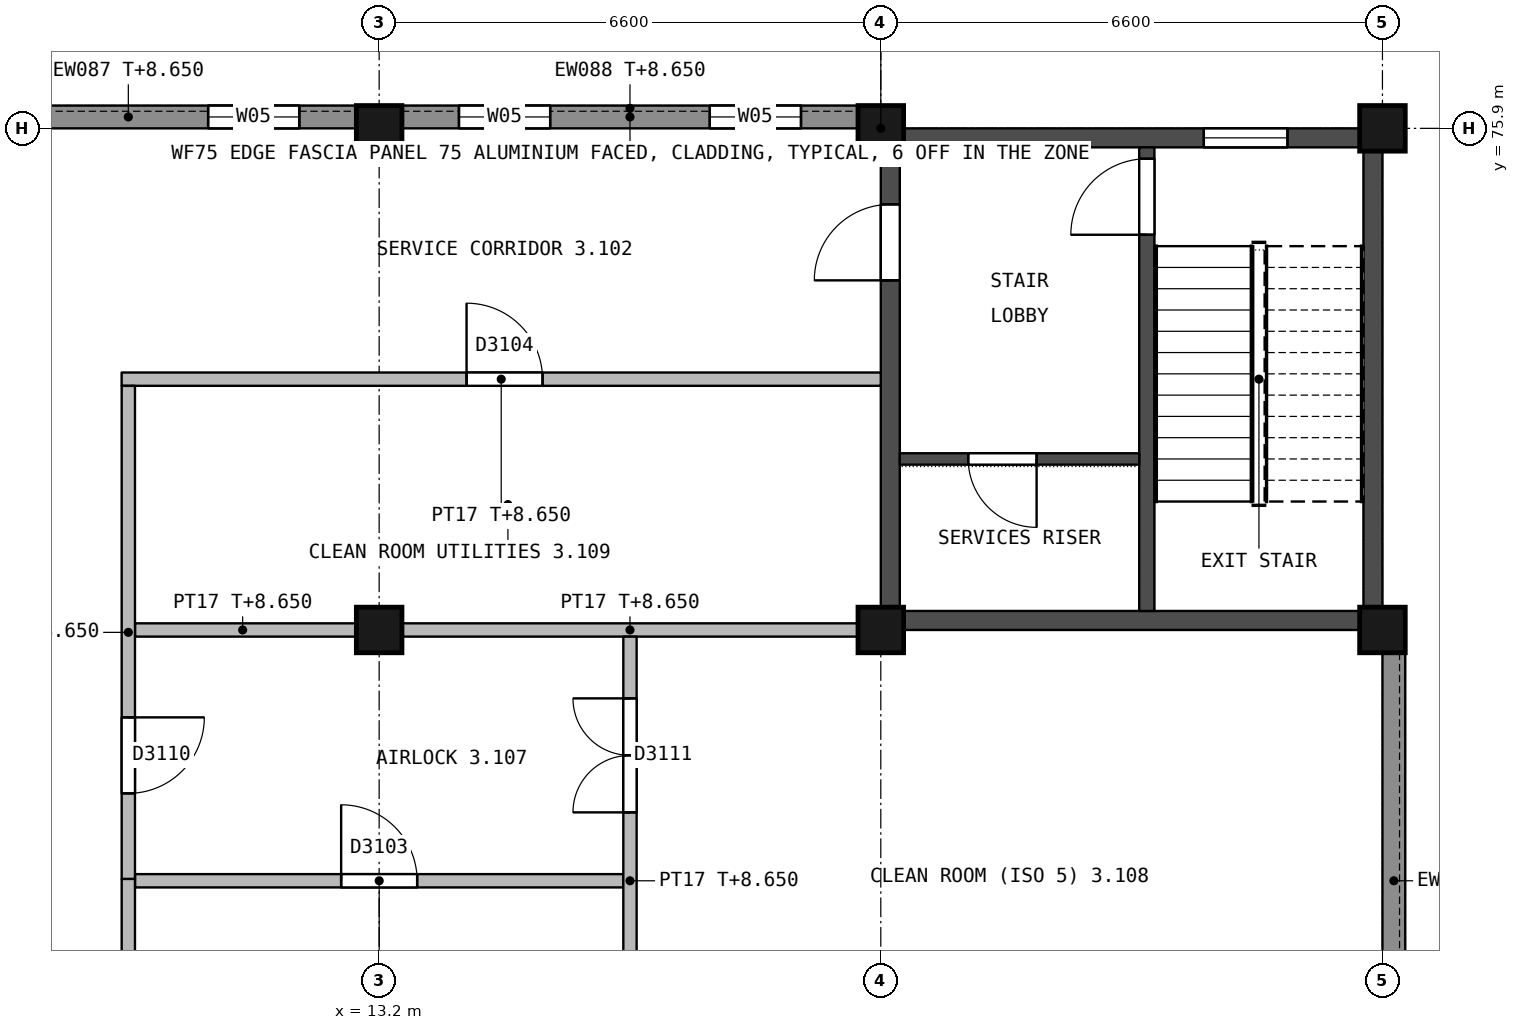
"""IFC4 building model, lengths in metres.
Left out: names, types, materials, properties, quantities, classifications, styles, units other than length and angle.
Written with IfcOpenShell. Run it as: python <this file> out.ifc"""

import sys

from ifc_helpers import new_model, si_unit, direction, frame, frame_2d, origin, origin_2d, place, context, subcontext, project, spatial, rectangle, extrude, element, fill, save


model = new_model("IFC4")
c1 = context("Model", 3, precision=1e-05, world=origin(), true_north=direction((0.0, 1.0)))
c2 = subcontext(c1, "Body", "Model", "MODEL_VIEW")
j1 = project(units=[si_unit("LENGTHUNIT", "METRE"), si_unit("PLANEANGLEUNIT", "RADIAN")], contexts=[c1])
p1 = place(None, origin())
s1 = spatial("IfcSite", under=j1, at=p1, CompositionType="ELEMENT")
p2 = place(p1, origin())
s2 = spatial("IfcBuilding", under=s1, at=p2, CompositionType="ELEMENT")
p3 = place(p2, frame((0.0, 0.0, 5.4)))
s3 = spatial("IfcBuildingStorey", under=s2, at=p3, CompositionType="ELEMENT", Elevation=5.4)
for number, where, z_axis, x_axis in (
    (1, (13.2, 69.3, 0.0), (0.0, 0.0, 1.0), (1.0, 0.0, 0.0)),
    (2, (13.2, 75.9, 0.0), (0.0, 0.0, 1.0), (1.0, 0.0, 0.0)),
    (3, (19.8, 69.3, 0.0), (0.0, 0.0, 1.0), (1.0, 0.0, 0.0)),
    (4, (19.8, 75.9, 0.0), (0.0, 0.0, 1.0), (1.0, 0.0, 0.0)),
    (5, (26.4, 69.3, 0.0), (0.0, 0.0, 1.0), (1.0, 0.0, 0.0)),
    (6, (26.4, 75.9, 0.0), (0.0, 0.0, 1.0), (1.0, 0.0, 0.0)),
):
    element("IfcColumn", number, at=place(p3, frame(where, z_axis=z_axis, x_axis=x_axis)), inside=s3, PredefinedType="COLUMN", context=c2, shape_type="SweptSolid", body=[
        extrude(rectangle(XDim=0.6, YDim=0.6, at=origin_2d()), origin(), (0.0, 0.0, 1.0), 4.5),
    ])
p4 = place(p3, frame((19.925, 75.9, 0.0), z_axis=(0.0, 0.0, 1.0), x_axis=(0.0, -1.0, 0.0)))
e7 = element("IfcWall", 7, at=p4, inside=s3, PredefinedType="SHEAR", context=c2, shape_type="SweptSolid", body=[
    extrude(rectangle(XDim=6.6, YDim=0.25, at=frame_2d((3.3, 0.0))), origin(), (0.0, 0.0, 1.0), 4.15),
])
p5 = place(p4, frame((1.0, 0.0, 0.0)))
e8 = element("IfcOpeningElement", 8, at=p5, cuts=e7, PredefinedType="OPENING", context=c2, shape_type="SweptSolid", body=[
    extrude(rectangle(XDim=1.0, YDim=2.1, at=frame_2d((0.5, 1.05))), frame((0.0, 0.135, 0.0), z_axis=(0.0, -1.0, 0.0), x_axis=(1.0, 0.0, 0.0)), (0.0, 0.0, 1.0), 0.27),
])
p6 = place(p3, frame((26.275, 75.9, 0.0), z_axis=(0.0, 0.0, 1.0), x_axis=(0.0, -1.0, 0.0)))
e9 = element("IfcWall", 9, at=p6, inside=s3, PredefinedType="SHEAR", context=c2, shape_type="SweptSolid", body=[
    extrude(rectangle(XDim=6.6, YDim=0.25, at=frame_2d((3.3, 0.0))), origin(), (0.0, 0.0, 1.0), 4.15),
])
p7 = place(p3, frame((20.05, 75.775, 0.0), z_axis=(0.0, 0.0, 1.0), x_axis=(1.0, 0.0, 0.0)))
e10 = element("IfcWall", 10, at=p7, inside=s3, PredefinedType="SHEAR", context=c2, shape_type="SweptSolid", body=[
    extrude(rectangle(XDim=6.1, YDim=0.25, at=frame_2d((3.05, 0.0))), origin(), (0.0, 0.0, 1.0), 4.15),
])
p8 = place(p7, frame((4.0, 0.0, 0.7)))
e11 = element("IfcOpeningElement", 11, at=p8, cuts=e10, PredefinedType="OPENING", context=c2, shape_type="SweptSolid", body=[
    extrude(rectangle(XDim=1.1, YDim=1.5, at=frame_2d((0.55, 0.75))), frame((0.0, 0.135, 0.0), z_axis=(0.0, -1.0, 0.0), x_axis=(1.0, 0.0, 0.0)), (0.0, 0.0, 1.0), 0.27),
])
p9 = place(p3, frame((20.05, 69.425, 0.0), z_axis=(0.0, 0.0, 1.0), x_axis=(1.0, 0.0, 0.0)))
e12 = element("IfcWall", 12, at=p9, inside=s3, PredefinedType="SHEAR", context=c2, shape_type="SweptSolid", body=[
    extrude(rectangle(XDim=6.1, YDim=0.25, at=frame_2d((3.05, 0.0))), origin(), (0.0, 0.0, 1.0), 4.15),
])
p10 = place(p3, frame((23.3, 75.65, 0.0), z_axis=(0.0, 0.0, 1.0), x_axis=(0.0, -1.0, 0.0)))
e13 = element("IfcWall", 13, at=p10, inside=s3, PredefinedType="SHEAR", context=c2, shape_type="SweptSolid", body=[
    extrude(rectangle(XDim=6.1, YDim=0.2, at=frame_2d((3.05, 0.0))), origin(), (0.0, 0.0, 1.0), 4.15),
])
p11 = place(p10, frame((0.15, 0.0, 0.0)))
e14 = element("IfcOpeningElement", 14, at=p11, cuts=e13, PredefinedType="OPENING", context=c2, shape_type="SweptSolid", body=[
    extrude(rectangle(XDim=1.0, YDim=2.1, at=frame_2d((0.5, 1.05))), frame((0.0, 0.11, 0.0), z_axis=(0.0, -1.0, 0.0), x_axis=(1.0, 0.0, 0.0)), (0.0, 0.0, 1.0), 0.22),
])
p12 = place(p3, frame((20.05, 71.55, 0.0), z_axis=(0.0, 0.0, 1.0), x_axis=(1.0, 0.0, 0.0)))
e15 = element("IfcWall", 15, at=p12, inside=s3, PredefinedType="SHEAR", context=c2, shape_type="SweptSolid", body=[
    extrude(rectangle(XDim=3.15, YDim=0.15, at=frame_2d((1.575, 0.0))), origin(), (0.0, 0.0, 1.0), 4.15),
])
p13 = place(p12, frame((0.9, 0.0, 0.0)))
e16 = element("IfcOpeningElement", 16, at=p13, cuts=e15, PredefinedType="OPENING", context=c2, shape_type="SweptSolid", body=[
    extrude(rectangle(XDim=0.9, YDim=2.1, at=frame_2d((0.45, 1.05))), frame((0.0, 0.085, 0.0), z_axis=(0.0, -1.0, 0.0), x_axis=(1.0, 0.0, 0.0)), (0.0, 0.0, 1.0), 0.17),
])
p14 = place(p3, frame((26.55, 69.0, 0.0), z_axis=(0.0, 0.0, 1.0), x_axis=(0.0, -1.0, 0.0)))
e17 = element("IfcWall", 17, at=p14, inside=s3, PredefinedType="STANDARD", context=c2, shape_type="SweptSolid", body=[
    extrude(rectangle(XDim=6.0, YDim=0.3, at=frame_2d((3.0, 0.0))), origin(), (0.0, 0.0, 1.0), 3.25),
])
p15 = place(p3, frame((6.9, 76.05, 0.0), z_axis=(0.0, 0.0, 1.0), x_axis=(1.0, 0.0, 0.0)))
e18 = element("IfcWall", 18, at=p15, inside=s3, PredefinedType="STANDARD", context=c2, shape_type="SweptSolid", body=[
    extrude(rectangle(XDim=6.0, YDim=0.3, at=frame_2d((3.0, 0.0))), origin(), (0.0, 0.0, 1.0), 3.25),
])
p16 = place(p15, frame((0.75, 0.0, 1.1)))
e19 = element("IfcOpeningElement", 19, at=p16, cuts=e18, PredefinedType="OPENING", context=c2, shape_type="SweptSolid", body=[
    extrude(rectangle(XDim=1.2, YDim=1.2, at=frame_2d((0.6, 0.6))), frame((0.0, 0.16, 0.0), z_axis=(0.0, -1.0, 0.0), x_axis=(1.0, 0.0, 0.0)), (0.0, 0.0, 1.0), 0.32),
])
p17 = place(p15, frame((4.05, 0.0, 1.1)))
e20 = element("IfcOpeningElement", 20, at=p17, cuts=e18, PredefinedType="OPENING", context=c2, shape_type="SweptSolid", body=[
    extrude(rectangle(XDim=1.2, YDim=1.2, at=frame_2d((0.6, 0.6))), frame((0.0, 0.16, 0.0), z_axis=(0.0, -1.0, 0.0), x_axis=(1.0, 0.0, 0.0)), (0.0, 0.0, 1.0), 0.32),
])
p18 = place(p3, frame((13.5, 76.05, 0.0), z_axis=(0.0, 0.0, 1.0), x_axis=(1.0, 0.0, 0.0)))
e21 = element("IfcWall", 21, at=p18, inside=s3, PredefinedType="STANDARD", context=c2, shape_type="SweptSolid", body=[
    extrude(rectangle(XDim=6.0, YDim=0.3, at=frame_2d((3.0, 0.0))), origin(), (0.0, 0.0, 1.0), 3.25),
])
p19 = place(p18, frame((0.75, 0.0, 1.1)))
e22 = element("IfcOpeningElement", 22, at=p19, cuts=e21, PredefinedType="OPENING", context=c2, shape_type="SweptSolid", body=[
    extrude(rectangle(XDim=1.2, YDim=1.2, at=frame_2d((0.6, 0.6))), frame((0.0, 0.16, 0.0), z_axis=(0.0, -1.0, 0.0), x_axis=(1.0, 0.0, 0.0)), (0.0, 0.0, 1.0), 0.32),
])
p20 = place(p18, frame((4.05, 0.0, 1.1)))
e23 = element("IfcOpeningElement", 23, at=p20, cuts=e21, PredefinedType="OPENING", context=c2, shape_type="SweptSolid", body=[
    extrude(rectangle(XDim=1.2, YDim=1.2, at=frame_2d((0.6, 0.6))), frame((0.0, 0.16, 0.0), z_axis=(0.0, -1.0, 0.0), x_axis=(1.0, 0.0, 0.0)), (0.0, 0.0, 1.0), 0.32),
])
p21 = place(p3, frame((16.413, 66.0, 0.0), z_axis=(0.0, 0.0, 1.0), x_axis=(-1.0, 0.0, 0.0)))
e24 = element("IfcWall", 24, at=p21, inside=s3, PredefinedType="PARTITIONING", context=c2, shape_type="SweptSolid", body=[
    extrude(rectangle(XDim=6.425, YDim=0.175, at=frame_2d((3.212, 0.0))), origin(), (0.0, 0.0, 1.0), 3.25),
])
p22 = place(p21, frame((2.713, 0.0, 0.0)))
e25 = element("IfcOpeningElement", 25, at=p22, cuts=e24, PredefinedType="OPENING", context=c2, shape_type="SweptSolid", body=[
    extrude(rectangle(XDim=1.0, YDim=2.1, at=frame_2d((0.5, 1.05))), frame((0.0, 0.097, 0.0), z_axis=(0.0, -1.0, 0.0), x_axis=(1.0, 0.0, 0.0)), (0.0, 0.0, 1.0), 0.195),
])
p23 = place(p3, frame((9.988, 69.3, 0.0), z_axis=(0.0, 0.0, 1.0), x_axis=(1.0, 0.0, 0.0)))
e26 = element("IfcWall", 26, at=p23, inside=s3, PredefinedType="PARTITIONING", context=c2, shape_type="SweptSolid", body=[
    extrude(rectangle(XDim=2.912, YDim=0.175, at=frame_2d((1.456, 0.0))), origin(), (0.0, 0.0, 1.0), 3.25),
])
p24 = place(p3, frame((13.5, 69.3, 0.0), z_axis=(0.0, 0.0, 1.0), x_axis=(1.0, 0.0, 0.0)))
e27 = element("IfcWall", 27, at=p24, inside=s3, PredefinedType="PARTITIONING", context=c2, shape_type="SweptSolid", body=[
    extrude(rectangle(XDim=6.0, YDim=0.175, at=frame_2d((3.0, 0.0))), origin(), (0.0, 0.0, 1.0), 3.25),
])
p25 = place(p3, frame((19.8, 72.6, 0.0), z_axis=(0.0, 0.0, 1.0), x_axis=(-1.0, 0.0, 0.0)))
e28 = element("IfcWall", 28, at=p25, inside=s3, PredefinedType="PARTITIONING", context=c2, shape_type="SweptSolid", body=[
    extrude(rectangle(XDim=9.988, YDim=0.175, at=frame_2d((4.994, 0.0))), origin(), (0.0, 0.0, 1.0), 3.25),
])
p26 = place(p25, frame((4.45, 0.0, 0.0)))
e29 = element("IfcOpeningElement", 29, at=p26, cuts=e28, PredefinedType="OPENING", context=c2, shape_type="SweptSolid", body=[
    extrude(rectangle(XDim=1.0, YDim=2.1, at=frame_2d((0.5, 1.05))), frame((0.0, 0.097, 0.0), z_axis=(0.0, -1.0, 0.0), x_axis=(1.0, 0.0, 0.0)), (0.0, 0.0, 1.0), 0.195),
])
p27 = place(p3, frame((9.9, 66.025, 0.0), z_axis=(0.0, 0.0, 1.0), x_axis=(0.0, -1.0, 0.0)))
e30 = element("IfcWall", 30, at=p27, inside=s3, PredefinedType="PARTITIONING", context=c2, shape_type="SweptSolid", body=[
    extrude(rectangle(XDim=6.65, YDim=0.175, at=frame_2d((3.325, 0.0))), origin(), (0.0, 0.0, 1.0), 3.25),
])
p28 = place(p27, frame((1.125, 0.0, 0.0)))
e31 = element("IfcOpeningElement", 31, at=p28, cuts=e30, PredefinedType="OPENING", context=c2, shape_type="SweptSolid", body=[
    extrude(rectangle(XDim=1.1, YDim=2.1, at=frame_2d((0.55, 1.05))), frame((0.0, 0.097, 0.0), z_axis=(0.0, -1.0, 0.0), x_axis=(1.0, 0.0, 0.0)), (0.0, 0.0, 1.0), 0.195),
])
p29 = place(p3, frame((9.9, 66.025, 0.0), z_axis=(0.0, 0.0, 1.0), x_axis=(0.0, 1.0, 0.0)))
e32 = element("IfcWall", 32, at=p29, inside=s3, PredefinedType="PARTITIONING", context=c2, shape_type="SweptSolid", body=[
    extrude(rectangle(XDim=6.487, YDim=0.175, at=frame_2d((3.244, 0.0))), origin(), (0.0, 0.0, 1.0), 3.25),
])
p30 = place(p29, frame((1.125, 0.0, 0.0)))
e33 = element("IfcOpeningElement", 33, at=p30, cuts=e32, PredefinedType="OPENING", context=c2, shape_type="SweptSolid", body=[
    extrude(rectangle(XDim=1.0, YDim=2.1, at=frame_2d((0.5, 1.05))), frame((0.0, 0.097, 0.0), z_axis=(0.0, -1.0, 0.0), x_axis=(1.0, 0.0, 0.0)), (0.0, 0.0, 1.0), 0.195),
])
p31 = place(p3, frame((16.5, 62.788, 0.0), z_axis=(0.0, 0.0, 1.0), x_axis=(0.0, 1.0, 0.0)))
e34 = element("IfcWall", 34, at=p31, inside=s3, PredefinedType="PARTITIONING", context=c2, shape_type="SweptSolid", body=[
    extrude(rectangle(XDim=6.424, YDim=0.175, at=frame_2d((3.212, 0.0))), origin(), (0.0, 0.0, 1.0), 3.25),
])
p32 = place(p31, frame((4.112, 0.0, 0.0)))
e35 = element("IfcOpeningElement", 35, at=p32, cuts=e34, PredefinedType="OPENING", context=c2, shape_type="SweptSolid", body=[
    extrude(rectangle(XDim=1.5, YDim=2.1, at=frame_2d((0.75, 1.05))), frame((0.0, 0.097, 0.0), z_axis=(0.0, -1.0, 0.0), x_axis=(1.0, 0.0, 0.0)), (0.0, 0.0, 1.0), 0.195),
])
p33 = place(p13, origin())
e36 = element("IfcDoor", 36, at=p33, inside=s3, OperationType="SINGLE_SWING_RIGHT", PredefinedType="DOOR", context=c2, shape_type="SweptSolid", body=[
    extrude(rectangle(XDim=0.9, YDim=2.1, at=frame_2d((0.45, 1.05))), frame((0.0, 0.025, 0.0), z_axis=(0.0, -1.0, 0.0), x_axis=(1.0, 0.0, 0.0)), (0.0, 0.0, 1.0), 0.05),
])
fill(e16, e36)
p34 = place(p5, origin())
e37 = element("IfcDoor", 37, at=p34, inside=s3, OperationType="SINGLE_SWING_RIGHT", PredefinedType="DOOR", context=c2, shape_type="SweptSolid", body=[
    extrude(rectangle(XDim=1.0, YDim=2.1, at=frame_2d((0.5, 1.05))), frame((0.0, 0.025, 0.0), z_axis=(0.0, -1.0, 0.0), x_axis=(1.0, 0.0, 0.0)), (0.0, 0.0, 1.0), 0.05),
])
fill(e8, e37)
p35 = place(p11, origin())
e38 = element("IfcDoor", 38, at=p35, inside=s3, OperationType="SINGLE_SWING_RIGHT", PredefinedType="DOOR", context=c2, shape_type="SweptSolid", body=[
    extrude(rectangle(XDim=1.0, YDim=2.1, at=frame_2d((0.5, 1.05))), frame((0.0, 0.025, 0.0), z_axis=(0.0, -1.0, 0.0), x_axis=(1.0, 0.0, 0.0)), (0.0, 0.0, 1.0), 0.05),
])
fill(e14, e38)
p36 = place(p8, origin())
e39 = element("IfcWindow", 39, at=p36, inside=s3, PartitioningType="SINGLE_PANEL", PredefinedType="WINDOW", context=c2, shape_type="SweptSolid", body=[
    extrude(rectangle(XDim=1.1, YDim=1.5, at=frame_2d((0.55, 0.75))), frame((0.0, 0.03, 0.0), z_axis=(0.0, -1.0, 0.0), x_axis=(1.0, 0.0, 0.0)), (0.0, 0.0, 1.0), 0.06),
])
fill(e11, e39)
p37 = place(p17, origin())
e40 = element("IfcWindow", 40, at=p37, inside=s3, PartitioningType="SINGLE_PANEL", PredefinedType="WINDOW", context=c2, shape_type="SweptSolid", body=[
    extrude(rectangle(XDim=1.2, YDim=1.2, at=frame_2d((0.6, 0.6))), frame((0.0, 0.03, 0.0), z_axis=(0.0, -1.0, 0.0), x_axis=(1.0, 0.0, 0.0)), (0.0, 0.0, 1.0), 0.06),
])
fill(e20, e40)
p38 = place(p19, origin())
e41 = element("IfcWindow", 41, at=p38, inside=s3, PartitioningType="SINGLE_PANEL", PredefinedType="WINDOW", context=c2, shape_type="SweptSolid", body=[
    extrude(rectangle(XDim=1.2, YDim=1.2, at=frame_2d((0.6, 0.6))), frame((0.0, 0.03, 0.0), z_axis=(0.0, -1.0, 0.0), x_axis=(1.0, 0.0, 0.0)), (0.0, 0.0, 1.0), 0.06),
])
fill(e22, e41)
p39 = place(p20, origin())
e42 = element("IfcWindow", 42, at=p39, inside=s3, PartitioningType="SINGLE_PANEL", PredefinedType="WINDOW", context=c2, shape_type="SweptSolid", body=[
    extrude(rectangle(XDim=1.2, YDim=1.2, at=frame_2d((0.6, 0.6))), frame((0.0, 0.03, 0.0), z_axis=(0.0, -1.0, 0.0), x_axis=(1.0, 0.0, 0.0)), (0.0, 0.0, 1.0), 0.06),
])
fill(e23, e42)
p40 = place(p22, origin())
e43 = element("IfcDoor", 43, at=p40, inside=s3, OperationType="SINGLE_SWING_RIGHT", PredefinedType="DOOR", context=c2, shape_type="SweptSolid", body=[
    extrude(rectangle(XDim=1.0, YDim=2.1, at=frame_2d((0.5, 1.05))), frame((0.0, 0.025, 0.0), z_axis=(0.0, -1.0, 0.0), x_axis=(1.0, 0.0, 0.0)), (0.0, 0.0, 1.0), 0.05),
])
fill(e25, e43)
p41 = place(p26, origin())
e44 = element("IfcDoor", 44, at=p41, inside=s3, OperationType="SINGLE_SWING_RIGHT", PredefinedType="DOOR", context=c2, shape_type="SweptSolid", body=[
    extrude(rectangle(XDim=1.0, YDim=2.1, at=frame_2d((0.5, 1.05))), frame((0.0, 0.025, 0.0), z_axis=(0.0, -1.0, 0.0), x_axis=(1.0, 0.0, 0.0)), (0.0, 0.0, 1.0), 0.05),
])
fill(e29, e44)
p42 = place(p30, origin())
e45 = element("IfcDoor", 45, at=p42, inside=s3, OperationType="SINGLE_SWING_RIGHT", PredefinedType="DOOR", context=c2, shape_type="SweptSolid", body=[
    extrude(rectangle(XDim=1.0, YDim=2.1, at=frame_2d((0.5, 1.05))), frame((0.0, 0.025, 0.0), z_axis=(0.0, -1.0, 0.0), x_axis=(1.0, 0.0, 0.0)), (0.0, 0.0, 1.0), 0.05),
])
fill(e33, e45)
p43 = place(p32, origin())
e46 = element("IfcDoor", 46, at=p43, inside=s3, OperationType="DOUBLE_DOOR_SINGLE_SWING", PredefinedType="DOOR", context=c2, shape_type="SweptSolid", body=[
    extrude(rectangle(XDim=1.5, YDim=2.1, at=frame_2d((0.75, 1.05))), frame((0.0, 0.025, 0.0), z_axis=(0.0, -1.0, 0.0), x_axis=(1.0, 0.0, 0.0)), (0.0, 0.0, 1.0), 0.05),
])
fill(e35, e46)
save(model, sys.argv[1])
